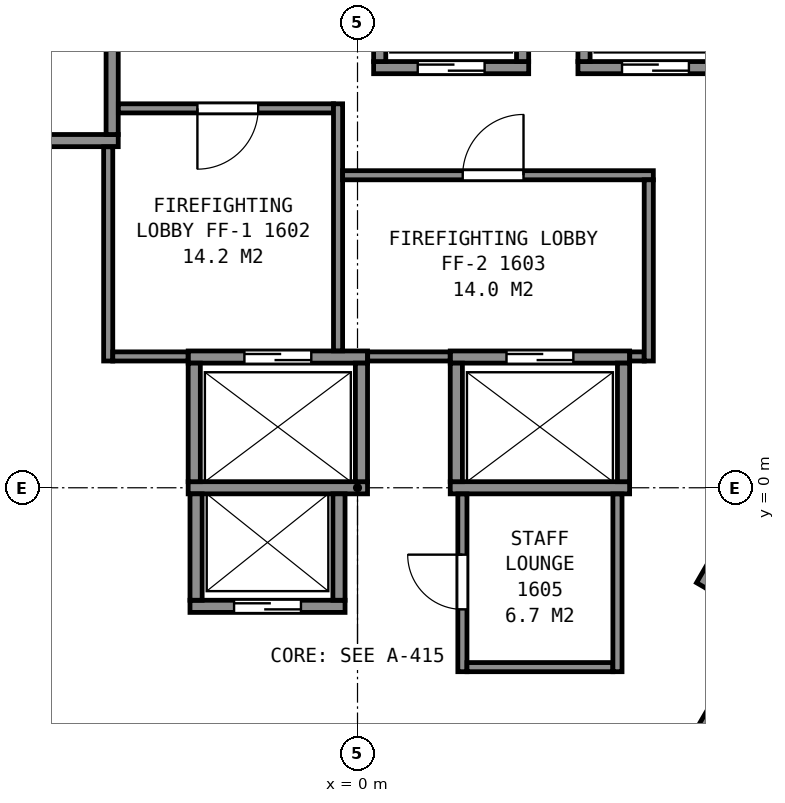
"""IFC4 building model, lengths in metres.
Left out: names, types, materials, properties, quantities, classifications, styles, units other than length and angle.
Written with IfcOpenShell. Run it as: python <this file> out.ifc"""

import sys

from ifc_helpers import new_model, si_unit, direction, frame, frame_2d, origin, place, context, subcontext, project, spatial, rectangle, extrude, element, fill, save


model = new_model("IFC4")
c1 = context("Model", 3, precision=1e-05, world=origin(), true_north=direction((0.0, 1.0)))
c2 = subcontext(c1, "Body", "Model", "MODEL_VIEW")
j1 = project(units=[si_unit("LENGTHUNIT", "METRE"), si_unit("PLANEANGLEUNIT", "RADIAN")], contexts=[c1])
p1 = place(None, origin())
s1 = spatial("IfcSite", under=j1, at=p1, CompositionType="ELEMENT")
p2 = place(p1, origin())
s2 = spatial("IfcBuilding", under=s1, at=p2, CompositionType="ELEMENT")
p3 = place(p2, frame((0.0, 0.0, 72.8)))
s3 = spatial("IfcBuildingStorey", under=s2, at=p3, CompositionType="ELEMENT", Elevation=72.8)
p4 = place(p3, frame((-2.755, -1.95, 0.0), z_axis=(0.0, 0.0, 1.0), x_axis=(1.0, 0.0, 0.0)))
e1 = element("IfcWall", 1, at=p4, inside=s3, PredefinedType="PARTITIONING", context=c2, shape_type="SweptSolid", body=[
    extrude(rectangle(XDim=2.55, YDim=0.2, at=frame_2d((1.275, 0.0))), origin(), (0.0, 0.0, 1.0), 3.6),
])
p5 = place(p4, frame((0.725, 0.0, 0.0)))
e2 = element("IfcOpeningElement", 2, at=p5, cuts=e1, PredefinedType="OPENING", context=c2, shape_type="SweptSolid", body=[
    extrude(rectangle(XDim=1.1, YDim=2.1, at=frame_2d((0.55, 1.05))), frame((0.0, 0.11, 0.0), z_axis=(0.0, -1.0, 0.0), x_axis=(1.0, 0.0, 0.0)), (0.0, 0.0, 1.0), 0.22),
])
p6 = place(p3, frame((-2.785, 0.0, 0.0), z_axis=(0.0, 0.0, 1.0), x_axis=(1.0, 0.0, 0.0)))
e3 = element("IfcWall", 3, at=p6, inside=s3, PredefinedType="PARTITIONING", context=c2, shape_type="SweptSolid", body=[
    extrude(rectangle(XDim=2.95, YDim=0.2, at=frame_2d((1.475, 0.0))), origin(), (0.0, 0.0, 1.0), 3.6),
])
p7 = place(p3, frame((1.525, 0.0, 0.0), z_axis=(0.0, 0.0, 1.0), x_axis=(1.0, 0.0, 0.0)))
e4 = element("IfcWall", 4, at=p7, inside=s3, PredefinedType="PARTITIONING", context=c2, shape_type="SweptSolid", body=[
    extrude(rectangle(XDim=2.95, YDim=0.2, at=frame_2d((1.475, 0.0))), origin(), (0.0, 0.0, 1.0), 3.6),
])
p8 = place(p3, frame((-2.785, 2.15, 0.0), z_axis=(0.0, 0.0, 1.0), x_axis=(1.0, 0.0, 0.0)))
e5 = element("IfcWall", 5, at=p8, inside=s3, PredefinedType="PARTITIONING", context=c2, shape_type="SweptSolid", body=[
    extrude(rectangle(XDim=2.95, YDim=0.2, at=frame_2d((1.475, 0.0))), origin(), (0.0, 0.0, 1.0), 3.6),
])
p9 = place(p8, frame((0.925, 0.0, 0.0)))
e6 = element("IfcOpeningElement", 6, at=p9, cuts=e5, PredefinedType="OPENING", context=c2, shape_type="SweptSolid", body=[
    extrude(rectangle(XDim=1.1, YDim=2.1, at=frame_2d((0.55, 1.05))), frame((0.0, 0.11, 0.0), z_axis=(0.0, -1.0, 0.0), x_axis=(1.0, 0.0, 0.0)), (0.0, 0.0, 1.0), 0.22),
])
p10 = place(p3, frame((1.525, 2.15, 0.0), z_axis=(0.0, 0.0, 1.0), x_axis=(1.0, 0.0, 0.0)))
e7 = element("IfcWall", 7, at=p10, inside=s3, PredefinedType="PARTITIONING", context=c2, shape_type="SweptSolid", body=[
    extrude(rectangle(XDim=2.95, YDim=0.2, at=frame_2d((1.475, 0.0))), origin(), (0.0, 0.0, 1.0), 3.6),
])
p11 = place(p10, frame((0.925, 0.0, 0.0)))
e8 = element("IfcOpeningElement", 8, at=p11, cuts=e7, PredefinedType="OPENING", context=c2, shape_type="SweptSolid", body=[
    extrude(rectangle(XDim=1.1, YDim=2.1, at=frame_2d((0.55, 1.05))), frame((0.0, 0.11, 0.0), z_axis=(0.0, -1.0, 0.0), x_axis=(1.0, 0.0, 0.0)), (0.0, 0.0, 1.0), 0.22),
])
p12 = place(p3, frame((-6.285, 5.71, 0.0), z_axis=(0.0, 0.0, 1.0), x_axis=(1.0, 0.0, 0.0)))
e9 = element("IfcWall", 9, at=p12, inside=s3, PredefinedType="PARTITIONING", context=c2, shape_type="SweptSolid", body=[
    extrude(rectangle(XDim=2.35, YDim=0.2, at=frame_2d((1.175, 0.0))), origin(), (0.0, 0.0, 1.0), 3.6),
])
p13 = place(p3, frame((0.265, 6.91, 0.0), z_axis=(0.0, 0.0, 1.0), x_axis=(1.0, 0.0, 0.0)))
e10 = element("IfcWall", 10, at=p13, inside=s3, PredefinedType="PARTITIONING", context=c2, shape_type="SweptSolid", body=[
    extrude(rectangle(XDim=2.55, YDim=0.2, at=frame_2d((1.275, 0.0))), origin(), (0.0, 0.0, 1.0), 3.6),
])
p14 = place(p13, frame((0.725, 0.0, 0.0)))
e11 = element("IfcOpeningElement", 11, at=p14, cuts=e10, PredefinedType="OPENING", context=c2, shape_type="SweptSolid", body=[
    extrude(rectangle(XDim=1.1, YDim=2.1, at=frame_2d((0.55, 1.05))), frame((0.0, 0.11, 0.0), z_axis=(0.0, -1.0, 0.0), x_axis=(1.0, 0.0, 0.0)), (0.0, 0.0, 1.0), 0.22),
])
p15 = place(p3, frame((3.625, 6.91, 0.0), z_axis=(0.0, 0.0, 1.0), x_axis=(1.0, 0.0, 0.0)))
e12 = element("IfcWall", 12, at=p15, inside=s3, PredefinedType="PARTITIONING", context=c2, shape_type="SweptSolid", body=[
    extrude(rectangle(XDim=2.55, YDim=0.2, at=frame_2d((1.275, 0.0))), origin(), (0.0, 0.0, 1.0), 3.6),
])
p16 = place(p15, frame((0.725, 0.0, 0.0)))
e13 = element("IfcOpeningElement", 13, at=p16, cuts=e12, PredefinedType="OPENING", context=c2, shape_type="SweptSolid", body=[
    extrude(rectangle(XDim=1.1, YDim=2.1, at=frame_2d((0.55, 1.05))), frame((0.0, 0.11, 0.0), z_axis=(0.0, -1.0, 0.0), x_axis=(1.0, 0.0, 0.0)), (0.0, 0.0, 1.0), 0.22),
])
p17 = place(p3, frame((5.527, -4.247, 0.0), z_axis=(0.0, 0.0, 1.0), x_axis=(0.499938297808, 0.866061024631, 0.0)))
e14 = element("IfcWall", 14, at=p17, inside=s3, PredefinedType="PARTITIONING", context=c2, shape_type="SweptSolid", body=[
    extrude(rectangle(XDim=2.35, YDim=0.2, at=frame_2d((1.175, 0.0))), origin(), (0.0, 0.0, 1.0), 3.6),
])
p18 = place(p17, frame((0.725, 0.0, 0.0)))
e15 = element("IfcOpeningElement", 15, at=p18, cuts=e14, PredefinedType="OPENING", context=c2, shape_type="SweptSolid", body=[
    extrude(rectangle(XDim=1.1, YDim=2.1, at=frame_2d((0.55, 1.05))), frame((0.0, 0.11, 0.0), z_axis=(0.0, -1.0, 0.0), x_axis=(1.0, 0.0, 0.0)), (0.0, 0.0, 1.0), 0.22),
])
p19 = place(p3, frame((5.663, -1.612, 0.0), z_axis=(0.0, 0.0, 1.0), x_axis=(0.49998122708, 0.866036242063, 0.0)))
e16 = element("IfcWall", 16, at=p19, inside=s3, PredefinedType="PARTITIONING", context=c2, shape_type="SweptSolid", body=[
    extrude(rectangle(XDim=4.9, YDim=0.2, at=frame_2d((2.45, 0.0))), origin(), (0.0, 0.0, 1.0), 3.6),
])
p20 = place(p3, frame((4.375, 0.1, 0.0), z_axis=(0.0, 0.0, 1.0), x_axis=(0.0, 1.0, 0.0)))
e17 = element("IfcWall", 17, at=p20, inside=s3, PredefinedType="PARTITIONING", context=c2, shape_type="SweptSolid", body=[
    extrude(rectangle(XDim=1.95, YDim=0.2, at=frame_2d((0.975, 0.0))), origin(), (0.0, 0.0, 1.0), 3.6),
])
for number, where, z_axis, x_axis in (
    (18, (3.725, 7.01, 0.0), (0.0, 0.0, 1.0), (0.0, 1.0, 0.0)),
    (19, (2.715, 7.01, 0.0), (0.0, 0.0, 1.0), (0.0, 1.0, 0.0)),
):
    element("IfcWall", number, at=place(p3, frame(where, z_axis=z_axis, x_axis=x_axis)), inside=s3, PredefinedType="PARTITIONING", context=c2, shape_type="SweptSolid", body=[
        extrude(rectangle(XDim=1.75, YDim=0.2, at=frame_2d((0.875, 0.0))), origin(), (0.0, 0.0, 1.0), 3.6),
    ])
p21 = place(p3, frame((1.625, 0.1, 0.0), z_axis=(0.0, 0.0, 1.0), x_axis=(0.0, 1.0, 0.0)))
e20 = element("IfcWall", 20, at=p21, inside=s3, PredefinedType="PARTITIONING", context=c2, shape_type="SweptSolid", body=[
    extrude(rectangle(XDim=1.95, YDim=0.2, at=frame_2d((0.975, 0.0))), origin(), (0.0, 0.0, 1.0), 3.6),
])
p22 = place(p3, frame((0.365, 7.01, 0.0), z_axis=(0.0, 0.0, 1.0), x_axis=(0.0, 1.0, 0.0)))
e21 = element("IfcWall", 21, at=p22, inside=s3, PredefinedType="PARTITIONING", context=c2, shape_type="SweptSolid", body=[
    extrude(rectangle(XDim=1.75, YDim=0.2, at=frame_2d((0.875, 0.0))), origin(), (0.0, 0.0, 1.0), 3.6),
])
p23 = place(p3, frame((0.065, 0.1, 0.0), z_axis=(0.0, 0.0, 1.0), x_axis=(0.0, 1.0, 0.0)))
e22 = element("IfcWall", 22, at=p23, inside=s3, PredefinedType="PARTITIONING", context=c2, shape_type="SweptSolid", body=[
    extrude(rectangle(XDim=1.95, YDim=0.2, at=frame_2d((0.975, 0.0))), origin(), (0.0, 0.0, 1.0), 3.6),
])
for number, where, z_axis, x_axis in (
    (23, (-0.305, -1.85, 0.0), (0.0, 0.0, 1.0), (0.0, 1.0, 0.0)),
    (24, (-2.655, -1.85, 0.0), (0.0, 0.0, 1.0), (0.0, 1.0, 0.0)),
):
    element("IfcWall", number, at=place(p3, frame(where, z_axis=z_axis, x_axis=x_axis)), inside=s3, PredefinedType="PARTITIONING", context=c2, shape_type="SweptSolid", body=[
        extrude(rectangle(XDim=1.75, YDim=0.2, at=frame_2d((0.875, 0.0))), origin(), (0.0, 0.0, 1.0), 3.6),
    ])
p24 = place(p3, frame((-2.685, 0.1, 0.0), z_axis=(0.0, 0.0, 1.0), x_axis=(0.0, 1.0, 0.0)))
e25 = element("IfcWall", 25, at=p24, inside=s3, PredefinedType="PARTITIONING", context=c2, shape_type="SweptSolid", body=[
    extrude(rectangle(XDim=1.95, YDim=0.2, at=frame_2d((0.975, 0.0))), origin(), (0.0, 0.0, 1.0), 3.6),
])
p25 = place(p3, frame((-4.035, 5.81, 0.0), z_axis=(0.0, 0.0, 1.0), x_axis=(0.0, 1.0, 0.0)))
e26 = element("IfcWall", 26, at=p25, inside=s3, PredefinedType="PARTITIONING", context=c2, shape_type="SweptSolid", body=[
    extrude(rectangle(XDim=1.75, YDim=0.2, at=frame_2d((0.875, 0.0))), origin(), (0.0, 0.0, 1.0), 3.6),
])
p26 = place(p3, frame((-13.664, 5.946, 0.0), z_axis=(0.0, 0.0, 1.0), x_axis=(0.499994327219, -0.866028678941, 0.0)))
e27 = element("IfcWall", 27, at=p26, inside=s3, PredefinedType="PARTITIONING", context=c2, shape_type="SweptSolid", body=[
    extrude(rectangle(XDim=23.968, YDim=0.2, at=frame_2d((11.984, 0.0))), origin(), (0.0, 0.0, 1.0), 3.35),
])
p27 = place(p3, frame((-4.152, -5.729, 0.0), z_axis=(0.0, 0.0, 1.0), x_axis=(-0.500024287448, 0.866011380966, 0.0)))
e28 = element("IfcWall", 28, at=p27, inside=s3, PredefinedType="PARTITIONING", context=c2, shape_type="SweptSolid", body=[
    extrude(rectangle(XDim=3.501, YDim=0.15, at=frame_2d((1.75, 0.0))), origin(), (0.0, 0.0, 1.0), 3.35),
])
p28 = place(p27, frame((2.026, 0.0, 0.0)))
e29 = element("IfcOpeningElement", 29, at=p28, cuts=e28, PredefinedType="OPENING", context=c2, shape_type="SweptSolid", body=[
    extrude(rectangle(XDim=0.9, YDim=2.1, at=frame_2d((0.45, 1.05))), frame((0.0, 0.085, 0.0), z_axis=(0.0, -1.0, 0.0), x_axis=(1.0, 0.0, 0.0)), (0.0, 0.0, 1.0), 0.17),
])
p29 = place(p27, frame((0.248, 0.0, 0.0)))
e30 = element("IfcOpeningElement", 30, at=p29, cuts=e28, PredefinedType="OPENING", context=c2, shape_type="SweptSolid", body=[
    extrude(rectangle(XDim=0.9, YDim=2.1, at=frame_2d((0.45, 1.05))), frame((0.0, 0.085, 0.0), z_axis=(0.0, -1.0, 0.0), x_axis=(1.0, 0.0, 0.0)), (0.0, 0.0, 1.0), 0.17),
])
p30 = place(p3, frame((-4.1, 2.085, 0.0), z_axis=(0.0, 0.0, 1.0), x_axis=(0.0, 1.0, 0.0)))
e31 = element("IfcWall", 31, at=p30, inside=s3, PredefinedType="PARTITIONING", context=c2, shape_type="SweptSolid", body=[
    extrude(rectangle(XDim=3.523, YDim=0.15, at=frame_2d((1.761, 0.0))), origin(), (0.0, 0.0, 1.0), 3.35),
])
p31 = place(p3, frame((-4.025, 2.16, 0.0), z_axis=(0.0, 0.0, 1.0), x_axis=(1.0, 0.0, 0.0)))
e32 = element("IfcWall", 32, at=p31, inside=s3, PredefinedType="PARTITIONING", context=c2, shape_type="SweptSolid", body=[
    extrude(rectangle(XDim=1.238, YDim=0.15, at=frame_2d((0.619, 0.0))), origin(), (0.0, 0.0, 1.0), 3.35),
])
p32 = place(p3, frame((-3.933, 6.24, 0.0), z_axis=(0.0, 0.0, 1.0), x_axis=(1.0, 0.0, 0.0)))
e33 = element("IfcWall", 33, at=p32, inside=s3, PredefinedType="PARTITIONING", context=c2, shape_type="SweptSolid", body=[
    extrude(rectangle(XDim=3.538, YDim=0.15, at=frame_2d((1.769, 0.0))), origin(), (0.0, 0.0, 1.0), 3.35),
])
p33 = place(p32, frame((1.3, 0.0, 0.0)))
e34 = element("IfcOpeningElement", 34, at=p33, cuts=e33, PredefinedType="OPENING", context=c2, shape_type="SweptSolid", body=[
    extrude(rectangle(XDim=1.0, YDim=2.1, at=frame_2d((0.5, 1.05))), frame((0.0, 0.085, 0.0), z_axis=(0.0, -1.0, 0.0), x_axis=(1.0, 0.0, 0.0)), (0.0, 0.0, 1.0), 0.17),
])
p34 = place(p3, frame((-0.32, 2.252, 0.0), z_axis=(0.0, 0.0, 1.0), x_axis=(0.0, 1.0, 0.0)))
e35 = element("IfcWall", 35, at=p34, inside=s3, PredefinedType="PARTITIONING", context=c2, shape_type="SweptSolid", body=[
    extrude(rectangle(XDim=4.063, YDim=0.15, at=frame_2d((2.031, 0.0))), origin(), (0.0, 0.0, 1.0), 3.35),
])
p35 = place(p3, frame((-0.245, 5.14, 0.0), z_axis=(0.0, 0.0, 1.0), x_axis=(1.0, 0.0, 0.0)))
e36 = element("IfcWall", 36, at=p35, inside=s3, PredefinedType="PARTITIONING", context=c2, shape_type="SweptSolid", body=[
    extrude(rectangle(XDim=5.11, YDim=0.15, at=frame_2d((2.555, 0.0))), origin(), (0.0, 0.0, 1.0), 3.35),
])
p36 = place(p35, frame((1.975, 0.0, 0.0)))
e37 = element("IfcOpeningElement", 37, at=p36, cuts=e36, PredefinedType="OPENING", context=c2, shape_type="SweptSolid", body=[
    extrude(rectangle(XDim=1.0, YDim=2.1, at=frame_2d((0.5, 1.05))), frame((0.0, 0.085, 0.0), z_axis=(0.0, -1.0, 0.0), x_axis=(1.0, 0.0, 0.0)), (0.0, 0.0, 1.0), 0.17),
])
p37 = place(p3, frame((0.167, 2.16, 0.0), z_axis=(0.0, 0.0, 1.0), x_axis=(1.0, 0.0, 0.0)))
e38 = element("IfcWall", 38, at=p37, inside=s3, PredefinedType="PARTITIONING", context=c2, shape_type="SweptSolid", body=[
    extrude(rectangle(XDim=1.356, YDim=0.15, at=frame_2d((0.678, 0.0))), origin(), (0.0, 0.0, 1.0), 3.35),
])
p38 = place(p3, frame((1.725, -0.102, 0.0), z_axis=(0.0, 0.0, 1.0), x_axis=(0.0, -1.0, 0.0)))
e39 = element("IfcWall", 39, at=p38, inside=s3, PredefinedType="PARTITIONING", context=c2, shape_type="SweptSolid", body=[
    extrude(rectangle(XDim=2.923, YDim=0.15, at=frame_2d((1.461, 0.0))), origin(), (0.0, 0.0, 1.0), 3.35),
])
p39 = place(p38, frame((0.998, 0.0, 0.0)))
e40 = element("IfcOpeningElement", 40, at=p39, cuts=e39, PredefinedType="OPENING", context=c2, shape_type="SweptSolid", body=[
    extrude(rectangle(XDim=0.9, YDim=2.1, at=frame_2d((0.45, 1.05))), frame((0.0, 0.085, 0.0), z_axis=(0.0, -1.0, 0.0), x_axis=(1.0, 0.0, 0.0)), (0.0, 0.0, 1.0), 0.17),
])
p40 = place(p3, frame((1.8, -2.95, 0.0), z_axis=(0.0, 0.0, 1.0), x_axis=(1.0, 0.0, 0.0)))
e41 = element("IfcWall", 41, at=p40, inside=s3, PredefinedType="PARTITIONING", context=c2, shape_type="SweptSolid", body=[
    extrude(rectangle(XDim=2.4, YDim=0.15, at=frame_2d((1.2, 0.0))), origin(), (0.0, 0.0, 1.0), 3.35),
])
p41 = place(p3, frame((4.275, -3.025, 0.0), z_axis=(0.0, 0.0, 1.0), x_axis=(0.0, 1.0, 0.0)))
e42 = element("IfcWall", 42, at=p41, inside=s3, PredefinedType="PARTITIONING", context=c2, shape_type="SweptSolid", body=[
    extrude(rectangle(XDim=2.923, YDim=0.15, at=frame_2d((1.461, 0.0))), origin(), (0.0, 0.0, 1.0), 3.35),
])
p42 = place(p3, frame((4.477, 2.16, 0.0), z_axis=(0.0, 0.0, 1.0), x_axis=(1.0, 0.0, 0.0)))
e43 = element("IfcWall", 43, at=p42, inside=s3, PredefinedType="PARTITIONING", context=c2, shape_type="SweptSolid", body=[
    extrude(rectangle(XDim=0.238, YDim=0.15, at=frame_2d((0.119, 0.0))), origin(), (0.0, 0.0, 1.0), 3.35),
])
p43 = place(p3, frame((4.79, 2.085, 0.0), z_axis=(0.0, 0.0, 1.0), x_axis=(0.0, 1.0, 0.0)))
e44 = element("IfcWall", 44, at=p43, inside=s3, PredefinedType="PARTITIONING", context=c2, shape_type="SweptSolid", body=[
    extrude(rectangle(XDim=2.98, YDim=0.15, at=frame_2d((1.49, 0.0))), origin(), (0.0, 0.0, 1.0), 3.35),
])
p44 = place(p3, frame((-3.766, -18.358, 0.0), z_axis=(0.0, 0.0, 1.0), x_axis=(-0.500003973642, 0.866023109589, 0.0)))
e45 = element("IfcWall", 45, at=p44, inside=s3, PredefinedType="PARTITIONING", context=c2, shape_type="SweptSolid", body=[
    extrude(rectangle(XDim=28.826, YDim=0.125, at=frame_2d((14.413, 0.0))), origin(), (0.0, 0.0, 1.0), 2.613),
])
p45 = place(p44, frame((27.114, 0.0, 0.0)))
e46 = element("IfcOpeningElement", 46, at=p45, cuts=e45, PredefinedType="OPENING", context=c2, shape_type="SweptSolid", body=[
    extrude(rectangle(XDim=0.9, YDim=2.1, at=frame_2d((0.45, 1.05))), frame((0.0, 0.073, 0.0), z_axis=(0.0, -1.0, 0.0), x_axis=(1.0, 0.0, 0.0)), (0.0, 0.0, 1.0), 0.145),
])
p46 = place(p44, frame((20.322, 0.0, 0.0)))
e47 = element("IfcOpeningElement", 47, at=p46, cuts=e45, PredefinedType="OPENING", context=c2, shape_type="SweptSolid", body=[
    extrude(rectangle(XDim=0.9, YDim=2.1, at=frame_2d((0.45, 1.05))), frame((0.0, 0.073, 0.0), z_axis=(0.0, -1.0, 0.0), x_axis=(1.0, 0.0, 0.0)), (0.0, 0.0, 1.0), 0.145),
])
p47 = place(p44, frame((17.68, 0.0, 0.0)))
e48 = element("IfcOpeningElement", 48, at=p47, cuts=e45, PredefinedType="OPENING", context=c2, shape_type="SweptSolid", body=[
    extrude(rectangle(XDim=0.9, YDim=2.1, at=frame_2d((0.45, 1.05))), frame((0.0, 0.073, 0.0), z_axis=(0.0, -1.0, 0.0), x_axis=(1.0, 0.0, 0.0)), (0.0, 0.0, 1.0), 0.145),
])
p48 = place(p44, frame((10.836, 0.0, 0.0)))
e49 = element("IfcOpeningElement", 49, at=p48, cuts=e45, PredefinedType="OPENING", context=c2, shape_type="SweptSolid", body=[
    extrude(rectangle(XDim=0.9, YDim=2.1, at=frame_2d((0.45, 1.05))), frame((0.0, 0.073, 0.0), z_axis=(0.0, -1.0, 0.0), x_axis=(1.0, 0.0, 0.0)), (0.0, 0.0, 1.0), 0.145),
])
p49 = place(p44, frame((7.342, 0.0, 0.0)))
e50 = element("IfcOpeningElement", 50, at=p49, cuts=e45, PredefinedType="OPENING", context=c2, shape_type="SweptSolid", body=[
    extrude(rectangle(XDim=0.9, YDim=2.1, at=frame_2d((0.45, 1.05))), frame((0.0, 0.073, 0.0), z_axis=(0.0, -1.0, 0.0), x_axis=(1.0, 0.0, 0.0)), (0.0, 0.0, 1.0), 0.145),
])
p50 = place(p3, frame((18.179, 6.606, 0.0), z_axis=(0.0, 0.0, 1.0), x_axis=(-0.500003973642, -0.866023109589, 0.0)))
e51 = element("IfcWall", 51, at=p50, inside=s3, PredefinedType="PARTITIONING", context=c2, shape_type="SweptSolid", body=[
    extrude(rectangle(XDim=28.826, YDim=0.125, at=frame_2d((14.413, 0.0))), origin(), (0.0, 0.0, 1.0), 2.613),
])
p51 = place(p50, frame((21.501, 0.0, 0.0)))
e52 = element("IfcOpeningElement", 52, at=p51, cuts=e51, PredefinedType="OPENING", context=c2, shape_type="SweptSolid", body=[
    extrude(rectangle(XDim=0.9, YDim=2.1, at=frame_2d((0.45, 1.05))), frame((0.0, 0.073, 0.0), z_axis=(0.0, -1.0, 0.0), x_axis=(1.0, 0.0, 0.0)), (0.0, 0.0, 1.0), 0.145),
])
p52 = place(p50, frame((18.894, 0.0, 0.0)))
e53 = element("IfcOpeningElement", 53, at=p52, cuts=e51, PredefinedType="OPENING", context=c2, shape_type="SweptSolid", body=[
    extrude(rectangle(XDim=0.9, YDim=2.1, at=frame_2d((0.45, 1.05))), frame((0.0, 0.073, 0.0), z_axis=(0.0, -1.0, 0.0), x_axis=(1.0, 0.0, 0.0)), (0.0, 0.0, 1.0), 0.145),
])
p53 = place(p50, frame((10.937, 0.0, 0.0)))
e54 = element("IfcOpeningElement", 54, at=p53, cuts=e51, PredefinedType="OPENING", context=c2, shape_type="SweptSolid", body=[
    extrude(rectangle(XDim=0.9, YDim=2.1, at=frame_2d((0.45, 1.05))), frame((0.0, 0.073, 0.0), z_axis=(0.0, -1.0, 0.0), x_axis=(1.0, 0.0, 0.0)), (0.0, 0.0, 1.0), 0.145),
])
p54 = place(p50, frame((7.535, 0.0, 0.0)))
e55 = element("IfcOpeningElement", 55, at=p54, cuts=e51, PredefinedType="OPENING", context=c2, shape_type="SweptSolid", body=[
    extrude(rectangle(XDim=0.9, YDim=2.1, at=frame_2d((0.45, 1.05))), frame((0.0, 0.073, 0.0), z_axis=(0.0, -1.0, 0.0), x_axis=(1.0, 0.0, 0.0)), (0.0, 0.0, 1.0), 0.145),
])
p55 = place(p50, frame((0.827, 0.0, 0.0)))
e56 = element("IfcOpeningElement", 56, at=p55, cuts=e51, PredefinedType="OPENING", context=c2, shape_type="SweptSolid", body=[
    extrude(rectangle(XDim=0.9, YDim=2.1, at=frame_2d((0.45, 1.05))), frame((0.0, 0.073, 0.0), z_axis=(0.0, -1.0, 0.0), x_axis=(1.0, 0.0, 0.0)), (0.0, 0.0, 1.0), 0.145),
])
p56 = place(p14, origin())
e57 = element("IfcDoor", 57, at=p56, inside=s3, OperationType="SLIDING_TO_LEFT", PredefinedType="DOOR", context=c2, shape_type="SweptSolid", body=[
    extrude(rectangle(XDim=1.1, YDim=2.1, at=frame_2d((0.55, 1.05))), frame((0.0, 0.025, 0.0), z_axis=(0.0, -1.0, 0.0), x_axis=(1.0, 0.0, 0.0)), (0.0, 0.0, 1.0), 0.05),
])
fill(e11, e57)
p57 = place(p5, origin())
e58 = element("IfcDoor", 58, at=p57, inside=s3, OperationType="SLIDING_TO_RIGHT", PredefinedType="DOOR", context=c2, shape_type="SweptSolid", body=[
    extrude(rectangle(XDim=1.1, YDim=2.1, at=frame_2d((0.55, 1.05))), frame((0.0, 0.025, 0.0), z_axis=(0.0, -1.0, 0.0), x_axis=(1.0, 0.0, 0.0)), (0.0, 0.0, 1.0), 0.05),
])
fill(e2, e58)
p58 = place(p16, origin())
e59 = element("IfcDoor", 59, at=p58, inside=s3, OperationType="SLIDING_TO_LEFT", PredefinedType="DOOR", context=c2, shape_type="SweptSolid", body=[
    extrude(rectangle(XDim=1.1, YDim=2.1, at=frame_2d((0.55, 1.05))), frame((0.0, 0.025, 0.0), z_axis=(0.0, -1.0, 0.0), x_axis=(1.0, 0.0, 0.0)), (0.0, 0.0, 1.0), 0.05),
])
fill(e13, e59)
p59 = place(p9, origin())
e60 = element("IfcDoor", 60, at=p59, inside=s3, OperationType="SLIDING_TO_LEFT", PredefinedType="DOOR", context=c2, shape_type="SweptSolid", body=[
    extrude(rectangle(XDim=1.1, YDim=2.1, at=frame_2d((0.55, 1.05))), frame((0.0, 0.025, 0.0), z_axis=(0.0, -1.0, 0.0), x_axis=(1.0, 0.0, 0.0)), (0.0, 0.0, 1.0), 0.05),
])
fill(e6, e60)
p60 = place(p11, origin())
e61 = element("IfcDoor", 61, at=p60, inside=s3, OperationType="SLIDING_TO_RIGHT", PredefinedType="DOOR", context=c2, shape_type="SweptSolid", body=[
    extrude(rectangle(XDim=1.1, YDim=2.1, at=frame_2d((0.55, 1.05))), frame((0.0, 0.025, 0.0), z_axis=(0.0, -1.0, 0.0), x_axis=(1.0, 0.0, 0.0)), (0.0, 0.0, 1.0), 0.05),
])
fill(e8, e61)
p61 = place(p33, origin())
e62 = element("IfcDoor", 62, at=p61, inside=s3, OperationType="SINGLE_SWING_LEFT", PredefinedType="DOOR", context=c2, shape_type="SweptSolid", body=[
    extrude(rectangle(XDim=1.0, YDim=2.1, at=frame_2d((0.5, 1.05))), frame((0.0, 0.025, 0.0), z_axis=(0.0, -1.0, 0.0), x_axis=(1.0, 0.0, 0.0)), (0.0, 0.0, 1.0), 0.05),
])
fill(e34, e62)
p62 = place(p36, origin())
e63 = element("IfcDoor", 63, at=p62, inside=s3, OperationType="SINGLE_SWING_RIGHT", PredefinedType="DOOR", context=c2, shape_type="SweptSolid", body=[
    extrude(rectangle(XDim=1.0, YDim=2.1, at=frame_2d((0.5, 1.05))), frame((0.0, 0.025, 0.0), z_axis=(0.0, -1.0, 0.0), x_axis=(1.0, 0.0, 0.0)), (0.0, 0.0, 1.0), 0.05),
])
fill(e37, e63)
p63 = place(p39, origin())
e64 = element("IfcDoor", 64, at=p63, inside=s3, OperationType="SINGLE_SWING_LEFT", PredefinedType="DOOR", context=c2, shape_type="SweptSolid", body=[
    extrude(rectangle(XDim=0.9, YDim=2.1, at=frame_2d((0.45, 1.05))), frame((0.0, 0.025, 0.0), z_axis=(0.0, -1.0, 0.0), x_axis=(1.0, 0.0, 0.0)), (0.0, 0.0, 1.0), 0.05),
])
fill(e40, e64)
save(model, sys.argv[1])
